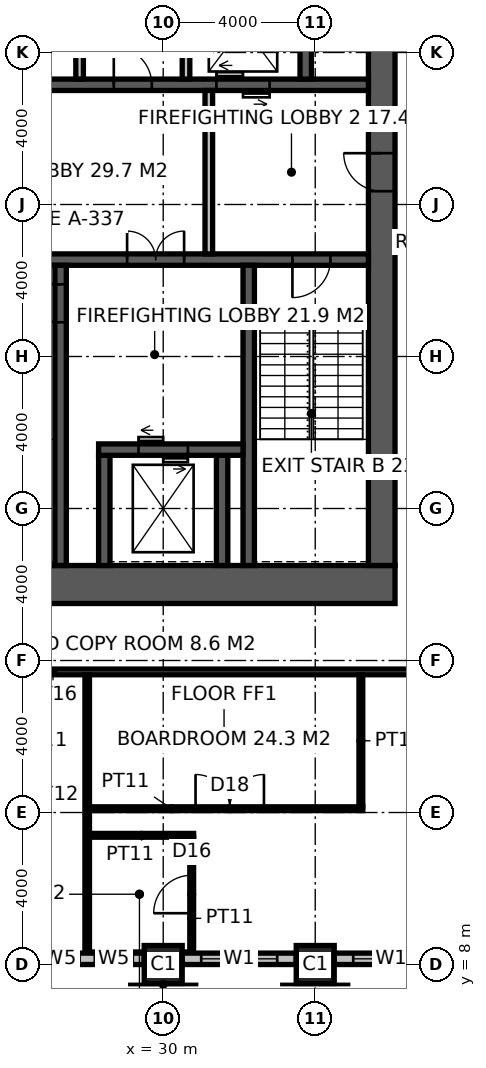
"""IFC4 building model, lengths in metres.
Left out: names, types, materials, properties, quantities, classifications, styles, units other than length and angle.
Written with IfcOpenShell. Run it as: python <this file> out.ifc"""

import sys

from ifc_helpers import new_model, si_unit, direction, frame, frame_2d, origin, origin_2d, place, context, subcontext, project, spatial, rectangle, hollow_rectangle, extrude, element, fill, save


model = new_model("IFC4")
c1 = context("Model", 3, precision=1e-05, world=origin(), true_north=direction((0.0, 1.0)))
c2 = subcontext(c1, "Body", "Model", "MODEL_VIEW")
j1 = project(units=[si_unit("LENGTHUNIT", "METRE"), si_unit("PLANEANGLEUNIT", "RADIAN")], contexts=[c1])
p1 = place(None, origin())
s1 = spatial("IfcSite", under=j1, at=p1, CompositionType="ELEMENT")
p2 = place(p1, origin())
s2 = spatial("IfcBuilding", under=s1, at=p2, CompositionType="ELEMENT")
p3 = place(p2, frame((0.0, 0.0, 230.2)))
s3 = spatial("IfcBuildingStorey", under=s2, at=p3, CompositionType="ELEMENT", Elevation=230.2)
for number, where, z_axis, x_axis in (
    (1, (30.0, 8.0, 0.0), (0.0, 0.0, 1.0), (1.0, 0.0, 0.0)),
    (2, (34.0, 8.0, 0.0), (0.0, 0.0, 1.0), (1.0, 0.0, 0.0)),
):
    element("IfcColumn", number, at=place(p3, frame(where, z_axis=z_axis, x_axis=x_axis)), inside=s3, PredefinedType="COLUMN", context=c2, shape_type="SweptSolid", body=[
        extrude(hollow_rectangle(XDim=1.0, YDim=1.0, WallThickness=0.1, at=origin_2d()), origin(), (0.0, 0.0, 1.0), 4.0),
    ])
p4 = place(p3, frame((18.5, 18.0, -0.15), z_axis=(0.0, 0.0, 1.0), x_axis=(1.0, 0.0, 0.0)))
e3 = element("IfcWall", 3, at=p4, inside=s3, PredefinedType="SHEAR", context=c2, shape_type="SweptSolid", body=[
    extrude(rectangle(XDim=17.6, YDim=1.0, at=frame_2d((8.8, 0.0))), origin(), (0.0, 0.0, 1.0), 4.0),
])
p5 = place(p4, frame((3.45, 0.0, 0.15)))
e4 = element("IfcOpeningElement", 4, at=p5, cuts=e3, PredefinedType="OPENING", context=c2, shape_type="SweptSolid", body=[
    extrude(rectangle(XDim=1.5, YDim=2.4, at=frame_2d((0.75, 1.2))), frame((0.0, 0.51, 0.0), z_axis=(0.0, -1.0, 0.0), x_axis=(1.0, 0.0, 0.0)), (0.0, 0.0, 1.0), 1.02),
])
p6 = place(p3, frame((35.75, 18.5, -0.15), z_axis=(0.0, 0.0, 1.0), x_axis=(0.0, 1.0, 0.0)))
e5 = element("IfcWall", 5, at=p6, inside=s3, PredefinedType="SHEAR", context=c2, shape_type="SweptSolid", body=[
    extrude(rectangle(XDim=17.0, YDim=0.7, at=frame_2d((8.5, 0.0))), origin(), (0.0, 0.0, 1.0), 4.0),
])
p7 = place(p6, frame((9.85, 0.0, 0.15)))
e6 = element("IfcOpeningElement", 6, at=p7, cuts=e5, PredefinedType="OPENING", context=c2, shape_type="SweptSolid", body=[
    extrude(rectangle(XDim=1.0, YDim=2.2, at=frame_2d((0.5, 1.1))), frame((0.0, 0.36, 0.0), z_axis=(0.0, -1.0, 0.0), x_axis=(1.0, 0.0, 0.0)), (0.0, 0.0, 1.0), 0.72),
])
p8 = place(p3, frame((24.15, 26.55, -0.15), z_axis=(0.0, 0.0, 1.0), x_axis=(1.0, 0.0, 0.0)))
e7 = element("IfcWall", 7, at=p8, inside=s3, PredefinedType="SHEAR", context=c2, shape_type="SweptSolid", body=[
    extrude(rectangle(XDim=11.25, YDim=0.3, at=frame_2d((5.625, 0.0))), origin(), (0.0, 0.0, 1.0), 4.0),
])
p9 = place(p8, frame((9.25, 0.0, 0.15)))
e8 = element("IfcOpeningElement", 8, at=p9, cuts=e7, PredefinedType="OPENING", context=c2, shape_type="SweptSolid", body=[
    extrude(rectangle(XDim=1.0, YDim=2.2, at=frame_2d((0.5, 1.1))), frame((0.0, 0.16, 0.0), z_axis=(0.0, -1.0, 0.0), x_axis=(1.0, 0.0, 0.0)), (0.0, 0.0, 1.0), 0.32),
])
p10 = place(p8, frame((4.9, 0.0, 0.15)))
e9 = element("IfcOpeningElement", 9, at=p10, cuts=e7, PredefinedType="OPENING", context=c2, shape_type="SweptSolid", body=[
    extrude(rectangle(XDim=1.5, YDim=2.4, at=frame_2d((0.75, 1.2))), frame((0.0, 0.16, 0.0), z_axis=(0.0, -1.0, 0.0), x_axis=(1.0, 0.0, 0.0)), (0.0, 0.0, 1.0), 0.32),
])
p11 = place(p3, frame((27.3, 18.5, -0.15), z_axis=(0.0, 0.0, 1.0), x_axis=(0.0, 1.0, 0.0)))
e10 = element("IfcWall", 10, at=p11, inside=s3, PredefinedType="SHEAR", context=c2, shape_type="SweptSolid", body=[
    extrude(rectangle(XDim=7.9, YDim=0.3, at=frame_2d((3.95, 0.0))), origin(), (0.0, 0.0, 1.0), 4.0),
])
p12 = place(p11, frame((6.4, 0.0, 0.15)))
e11 = element("IfcOpeningElement", 11, at=p12, cuts=e10, PredefinedType="OPENING", context=c2, shape_type="SweptSolid", body=[
    extrude(rectangle(XDim=1.0, YDim=2.2, at=frame_2d((0.5, 1.1))), frame((0.0, 0.16, 0.0), z_axis=(0.0, -1.0, 0.0), x_axis=(1.0, 0.0, 0.0)), (0.0, 0.0, 1.0), 0.32),
])
p13 = place(p3, frame((32.25, 18.5, -0.15), z_axis=(0.0, 0.0, 1.0), x_axis=(0.0, 1.0, 0.0)))
e12 = element("IfcWall", 12, at=p13, inside=s3, PredefinedType="SHEAR", context=c2, shape_type="SweptSolid", body=[
    extrude(rectangle(XDim=7.9, YDim=0.3, at=frame_2d((3.95, 0.0))), origin(), (0.0, 0.0, 1.0), 4.0),
])
for number, where, z_axis, x_axis in (
    (13, (28.45, 18.5, -0.15), (0.0, 0.0, 1.0), (0.0, 1.0, 0.0)),
    (14, (31.55, 18.5, -0.15), (0.0, 0.0, 1.0), (0.0, 1.0, 0.0)),
):
    element("IfcWall", number, at=place(p3, frame(where, z_axis=z_axis, x_axis=x_axis)), inside=s3, PredefinedType="SHEAR", context=c2, shape_type="SweptSolid", body=[
        extrude(rectangle(XDim=2.9, YDim=0.3, at=frame_2d((1.45, 0.0))), origin(), (0.0, 0.0, 1.0), 4.0),
    ])
p14 = place(p3, frame((28.3, 21.55, -0.15), z_axis=(0.0, 0.0, 1.0), x_axis=(1.0, 0.0, 0.0)))
e15 = element("IfcWall", 15, at=p14, inside=s3, PredefinedType="SHEAR", context=c2, shape_type="SweptSolid", body=[
    extrude(rectangle(XDim=3.8, YDim=0.3, at=frame_2d((1.9, 0.0))), origin(), (0.0, 0.0, 1.0), 4.0),
])
p15 = place(p14, frame((1.05, 0.0, 0.15)))
e16 = element("IfcOpeningElement", 16, at=p15, cuts=e15, PredefinedType="OPENING", context=c2, shape_type="SweptSolid", body=[
    extrude(rectangle(XDim=1.3, YDim=2.4, at=frame_2d((0.65, 1.2))), frame((0.0, 0.16, 0.0), z_axis=(0.0, -1.0, 0.0), x_axis=(1.0, 0.0, 0.0)), (0.0, 0.0, 1.0), 0.32),
])
p16 = place(p3, frame((24.15, 31.15, -0.15), z_axis=(0.0, 0.0, 1.0), x_axis=(1.0, 0.0, 0.0)))
e17 = element("IfcWall", 17, at=p16, inside=s3, PredefinedType="SHEAR", context=c2, shape_type="SweptSolid", body=[
    extrude(rectangle(XDim=11.25, YDim=0.3, at=frame_2d((5.625, 0.0))), origin(), (0.0, 0.0, 1.0), 4.0),
])
p17 = place(p16, frame((1.75, 0.0, 0.15)))
e18 = element("IfcOpeningElement", 18, at=p17, cuts=e17, PredefinedType="OPENING", context=c2, shape_type="SweptSolid", body=[
    extrude(rectangle(XDim=1.0, YDim=2.2, at=frame_2d((0.5, 1.1))), frame((0.0, 0.16, 0.0), z_axis=(0.0, -1.0, 0.0), x_axis=(1.0, 0.0, 0.0)), (0.0, 0.0, 1.0), 0.32),
])
p18 = place(p16, frame((4.55, 0.0, 0.15)))
e19 = element("IfcOpeningElement", 19, at=p18, cuts=e17, PredefinedType="OPENING", context=c2, shape_type="SweptSolid", body=[
    extrude(rectangle(XDim=1.0, YDim=2.2, at=frame_2d((0.5, 1.1))), frame((0.0, 0.16, 0.0), z_axis=(0.0, -1.0, 0.0), x_axis=(1.0, 0.0, 0.0)), (0.0, 0.0, 1.0), 0.32),
])
p19 = place(p16, frame((7.25, 0.0, 0.15)))
e20 = element("IfcOpeningElement", 20, at=p19, cuts=e17, PredefinedType="OPENING", context=c2, shape_type="SweptSolid", body=[
    extrude(rectangle(XDim=1.4, YDim=2.4, at=frame_2d((0.7, 1.2))), frame((0.0, 0.16, 0.0), z_axis=(0.0, -1.0, 0.0), x_axis=(1.0, 0.0, 0.0)), (0.0, 0.0, 1.0), 0.32),
])
p20 = place(p3, frame((33.75, 31.3, -0.15), z_axis=(0.0, 0.0, 1.0), x_axis=(0.0, 1.0, 0.0)))
e21 = element("IfcWall", 21, at=p20, inside=s3, PredefinedType="SHEAR", context=c2, shape_type="SweptSolid", body=[
    extrude(rectangle(XDim=4.2, YDim=0.3, at=frame_2d((2.1, 0.0))), origin(), (0.0, 0.0, 1.0), 4.0),
])
for number, where, z_axis, x_axis in (
    (22, (27.8, 31.3, -0.15), (0.0, 0.0, 1.0), (0.0, 1.0, 0.0)),
    (23, (30.6, 31.3, -0.15), (0.0, 0.0, 1.0), (0.0, 1.0, 0.0)),
):
    element("IfcWall", number, at=place(p3, frame(where, z_axis=z_axis, x_axis=x_axis)), inside=s3, PredefinedType="SOLIDWALL", context=c2, shape_type="SweptSolid", body=[
        extrude(rectangle(XDim=2.8, YDim=0.2, at=frame_2d((1.4, 0.0))), origin(), (0.0, 0.0, 1.0), 4.0),
    ])
p21 = place(p3, frame((31.2, 26.7, 0.0), z_axis=(0.0, 0.0, 1.0), x_axis=(0.0, 1.0, 0.0)))
e24 = element("IfcWall", 24, at=p21, inside=s3, PredefinedType="SOLIDWALL", context=c2, shape_type="SweptSolid", body=[
    extrude(rectangle(XDim=4.3, YDim=0.2, at=frame_2d((2.15, 0.0))), origin(), (0.0, 0.0, 1.0), 3.85),
])
p22 = place(p3, frame((15.775, 15.7, 0.0), z_axis=(0.0, 0.0, 1.0), x_axis=(1.0, 0.0, 0.0)))
e25 = element("IfcWall", 25, at=p22, inside=s3, PredefinedType="PARTITIONING", context=c2, shape_type="SweptSolid", body=[
    extrude(rectangle(XDim=22.65, YDim=0.15, at=frame_2d((11.325, 0.0))), origin(), (0.0, 0.0, 1.0), 3.85),
])
p23 = place(p3, frame((28.0, 8.3, 0.0), z_axis=(0.0, 0.0, 1.0), x_axis=(0.0, 1.0, 0.0)))
e26 = element("IfcWall", 26, at=p23, inside=s3, PredefinedType="PARTITIONING", context=c2, shape_type="SweptSolid", body=[
    extrude(rectangle(XDim=7.325, YDim=0.12, at=frame_2d((3.663, 0.0))), origin(), (0.0, 0.0, 1.0), 3.85),
])
p24 = place(p3, frame((28.06, 11.4, 0.0), z_axis=(0.0, 0.0, 1.0), x_axis=(1.0, 0.0, 0.0)))
e27 = element("IfcWall", 27, at=p24, inside=s3, PredefinedType="PARTITIONING", context=c2, shape_type="SweptSolid", body=[
    extrude(rectangle(XDim=2.74, YDim=0.1, at=frame_2d((1.37, 0.0))), origin(), (0.0, 0.0, 1.0), 3.85),
])
p25 = place(p3, frame((28.061, 12.1, 0.0), z_axis=(0.0, 0.0, 1.0), x_axis=(1.0, 0.0, 0.0)))
e28 = element("IfcWall", 28, at=p25, inside=s3, PredefinedType="PARTITIONING", context=c2, shape_type="SweptSolid", body=[
    extrude(rectangle(XDim=7.19, YDim=0.1, at=frame_2d((3.595, 0.0))), origin(), (0.0, 0.0, 1.0), 3.85),
])
p26 = place(p25, frame((2.79, 0.0, 0.0)))
e29 = element("IfcOpeningElement", 29, at=p26, cuts=e28, PredefinedType="OPENING", context=c2, shape_type="SweptSolid", body=[
    extrude(rectangle(XDim=1.8, YDim=2.4, at=frame_2d((0.9, 1.2))), frame((0.0, 0.06, 0.0), z_axis=(0.0, -1.0, 0.0), x_axis=(1.0, 0.0, 0.0)), (0.0, 0.0, 1.0), 0.12),
])
p27 = place(p3, frame((30.75, 8.3, 0.0), z_axis=(0.0, 0.0, 1.0), x_axis=(0.0, 1.0, 0.0)))
e30 = element("IfcWall", 30, at=p27, inside=s3, PredefinedType="PARTITIONING", context=c2, shape_type="SweptSolid", body=[
    extrude(rectangle(XDim=3.05, YDim=0.1, at=frame_2d((1.525, 0.0))), origin(), (0.0, 0.0, 1.0), 3.85),
])
p28 = place(p27, frame((1.05, 0.0, 0.0)))
e31 = element("IfcOpeningElement", 31, at=p28, cuts=e30, PredefinedType="OPENING", context=c2, shape_type="SweptSolid", body=[
    extrude(rectangle(XDim=1.0, YDim=2.2, at=frame_2d((0.5, 1.1))), frame((0.0, 0.06, 0.0), z_axis=(0.0, -1.0, 0.0), x_axis=(1.0, 0.0, 0.0)), (0.0, 0.0, 1.0), 0.12),
])
p29 = place(p3, frame((35.201, 12.15, 0.0), z_axis=(0.0, 0.0, 1.0), x_axis=(0.0, 1.0, 0.0)))
e32 = element("IfcWall", 32, at=p29, inside=s3, PredefinedType="PARTITIONING", context=c2, shape_type="SweptSolid", body=[
    extrude(rectangle(XDim=3.475, YDim=0.1, at=frame_2d((1.738, 0.0))), origin(), (0.0, 0.0, 1.0), 3.85),
])
p30 = place(p3, frame((26.5, 8.15, 0.0), z_axis=(0.0, 0.0, 1.0), x_axis=(1.0, 0.0, 0.0)))
e33 = element("IfcWall", 33, at=p30, inside=s3, PredefinedType="ELEMENTEDWALL", context=c2, shape_type="SweptSolid", body=[
    extrude(rectangle(XDim=3.0, YDim=0.3, at=frame_2d((1.5, 0.0))), origin(), (0.0, 0.0, 1.0), 2.85),
])
p31 = place(p30, frame((0.3, 0.0, 0.8)))
e34 = element("IfcOpeningElement", 34, at=p31, cuts=e33, PredefinedType="OPENING", context=c2, shape_type="SweptSolid", body=[
    extrude(rectangle(XDim=1.0, YDim=2.0, at=frame_2d((0.5, 1.0))), frame((0.0, 0.16, 0.0), z_axis=(0.0, -1.0, 0.0), x_axis=(1.0, 0.0, 0.0)), (0.0, 0.0, 1.0), 0.32),
])
p32 = place(p30, frame((1.7, 0.0, 0.8)))
e35 = element("IfcOpeningElement", 35, at=p32, cuts=e33, PredefinedType="OPENING", context=c2, shape_type="SweptSolid", body=[
    extrude(rectangle(XDim=1.0, YDim=2.0, at=frame_2d((0.5, 1.0))), frame((0.0, 0.16, 0.0), z_axis=(0.0, -1.0, 0.0), x_axis=(1.0, 0.0, 0.0)), (0.0, 0.0, 1.0), 0.32),
])
p33 = place(p3, frame((30.5, 8.15, 0.0), z_axis=(0.0, 0.0, 1.0), x_axis=(1.0, 0.0, 0.0)))
e36 = element("IfcWall", 36, at=p33, inside=s3, PredefinedType="ELEMENTEDWALL", context=c2, shape_type="SweptSolid", body=[
    extrude(rectangle(XDim=3.0, YDim=0.3, at=frame_2d((1.5, 0.0))), origin(), (0.0, 0.0, 1.0), 2.85),
])
p34 = place(p33, frame((0.5, 0.0, 0.8)))
e37 = element("IfcOpeningElement", 37, at=p34, cuts=e36, PredefinedType="OPENING", context=c2, shape_type="SweptSolid", body=[
    extrude(rectangle(XDim=2.0, YDim=2.0, at=frame_2d((1.0, 1.0))), frame((0.0, 0.16, 0.0), z_axis=(0.0, -1.0, 0.0), x_axis=(1.0, 0.0, 0.0)), (0.0, 0.0, 1.0), 0.32),
])
p35 = place(p3, frame((34.5, 8.15, 0.0), z_axis=(0.0, 0.0, 1.0), x_axis=(1.0, 0.0, 0.0)))
e38 = element("IfcWall", 38, at=p35, inside=s3, PredefinedType="ELEMENTEDWALL", context=c2, shape_type="SweptSolid", body=[
    extrude(rectangle(XDim=3.0, YDim=0.3, at=frame_2d((1.5, 0.0))), origin(), (0.0, 0.0, 1.0), 2.85),
])
p36 = place(p35, frame((0.5, 0.0, 0.8)))
e39 = element("IfcOpeningElement", 39, at=p36, cuts=e38, PredefinedType="OPENING", context=c2, shape_type="SweptSolid", body=[
    extrude(rectangle(XDim=2.0, YDim=2.0, at=frame_2d((1.0, 1.0))), frame((0.0, 0.16, 0.0), z_axis=(0.0, -1.0, 0.0), x_axis=(1.0, 0.0, 0.0)), (0.0, 0.0, 1.0), 0.32),
])
p37 = place(p12, origin())
e40 = element("IfcDoor", 40, at=p37, inside=s3, OperationType="SINGLE_SWING_RIGHT", PredefinedType="DOOR", context=c2, shape_type="SweptSolid", body=[
    extrude(rectangle(XDim=1.0, YDim=2.2, at=frame_2d((0.5, 1.1))), frame((0.0, 0.025, 0.0), z_axis=(0.0, -1.0, 0.0), x_axis=(1.0, 0.0, 0.0)), (0.0, 0.0, 1.0), 0.05),
])
fill(e11, e40)
p38 = place(p9, frame((1.0, 0.0, 0.0), z_axis=(0.0, 0.0, 1.0), x_axis=(-1.0, 0.0, 0.0)))
e41 = element("IfcDoor", 41, at=p38, inside=s3, OperationType="SINGLE_SWING_RIGHT", PredefinedType="DOOR", context=c2, shape_type="SweptSolid", body=[
    extrude(rectangle(XDim=1.0, YDim=2.2, at=frame_2d((0.5, 1.1))), frame((0.0, 0.025, 0.0), z_axis=(0.0, -1.0, 0.0), x_axis=(1.0, 0.0, 0.0)), (0.0, 0.0, 1.0), 0.05),
])
fill(e8, e41)
p39 = place(p7, origin())
e42 = element("IfcDoor", 42, at=p39, inside=s3, OperationType="SINGLE_SWING_RIGHT", PredefinedType="DOOR", context=c2, shape_type="SweptSolid", body=[
    extrude(rectangle(XDim=1.0, YDim=2.2, at=frame_2d((0.5, 1.1))), frame((0.0, 0.025, 0.0), z_axis=(0.0, -1.0, 0.0), x_axis=(1.0, 0.0, 0.0)), (0.0, 0.0, 1.0), 0.05),
])
fill(e6, e42)
p40 = place(p10, origin())
e43 = element("IfcDoor", 43, at=p40, inside=s3, OperationType="DOUBLE_DOOR_DOUBLE_SWING", PredefinedType="DOOR", context=c2, shape_type="SweptSolid", body=[
    extrude(rectangle(XDim=1.5, YDim=2.4, at=frame_2d((0.75, 1.2))), frame((0.0, 0.025, 0.0), z_axis=(0.0, -1.0, 0.0), x_axis=(1.0, 0.0, 0.0)), (0.0, 0.0, 1.0), 0.05),
])
fill(e9, e43)
p41 = place(p18, origin())
e44 = element("IfcDoor", 44, at=p41, inside=s3, OperationType="SINGLE_SWING_LEFT", PredefinedType="DOOR", context=c2, shape_type="SweptSolid", body=[
    extrude(rectangle(XDim=1.0, YDim=2.2, at=frame_2d((0.5, 1.1))), frame((0.0, 0.025, 0.0), z_axis=(0.0, -1.0, 0.0), x_axis=(1.0, 0.0, 0.0)), (0.0, 0.0, 1.0), 0.05),
])
fill(e19, e44)
p42 = place(p26, origin())
e45 = element("IfcDoor", 45, at=p42, inside=s3, OperationType="DOUBLE_DOOR_DOUBLE_SWING", PredefinedType="DOOR", context=c2, shape_type="SweptSolid", body=[
    extrude(rectangle(XDim=1.8, YDim=2.4, at=frame_2d((0.9, 1.2))), frame((0.0, 0.025, 0.0), z_axis=(0.0, -1.0, 0.0), x_axis=(1.0, 0.0, 0.0)), (0.0, 0.0, 1.0), 0.05),
])
fill(e29, e45)
p43 = place(p28, origin())
e46 = element("IfcDoor", 46, at=p43, inside=s3, OperationType="SINGLE_SWING_LEFT", PredefinedType="DOOR", context=c2, shape_type="SweptSolid", body=[
    extrude(rectangle(XDim=1.0, YDim=2.2, at=frame_2d((0.5, 1.1))), frame((0.0, 0.025, 0.0), z_axis=(0.0, -1.0, 0.0), x_axis=(1.0, 0.0, 0.0)), (0.0, 0.0, 1.0), 0.05),
])
fill(e31, e46)
p44 = place(p15, origin())
e47 = element("IfcDoor", 47, at=p44, inside=s3, OperationType="DOUBLE_DOOR_SLIDING", PredefinedType="DOOR", context=c2, shape_type="SweptSolid", body=[
    extrude(rectangle(XDim=1.3, YDim=2.4, at=frame_2d((0.65, 1.2))), frame((0.0, 0.025, 0.0), z_axis=(0.0, -1.0, 0.0), x_axis=(1.0, 0.0, 0.0)), (0.0, 0.0, 1.0), 0.05),
])
fill(e16, e47)
p45 = place(p19, origin())
e48 = element("IfcDoor", 48, at=p45, inside=s3, OperationType="DOUBLE_DOOR_SLIDING", PredefinedType="DOOR", context=c2, shape_type="SweptSolid", body=[
    extrude(rectangle(XDim=1.4, YDim=2.4, at=frame_2d((0.7, 1.2))), frame((0.0, 0.025, 0.0), z_axis=(0.0, -1.0, 0.0), x_axis=(1.0, 0.0, 0.0)), (0.0, 0.0, 1.0), 0.05),
])
fill(e20, e48)
p46 = place(p31, origin())
e49 = element("IfcWindow", 49, at=p46, inside=s3, PartitioningType="SINGLE_PANEL", PredefinedType="WINDOW", context=c2, shape_type="SweptSolid", body=[
    extrude(rectangle(XDim=1.0, YDim=2.0, at=frame_2d((0.5, 1.0))), frame((0.0, 0.03, 0.0), z_axis=(0.0, -1.0, 0.0), x_axis=(1.0, 0.0, 0.0)), (0.0, 0.0, 1.0), 0.06),
])
fill(e34, e49)
p47 = place(p32, origin())
e50 = element("IfcWindow", 50, at=p47, inside=s3, PartitioningType="SINGLE_PANEL", PredefinedType="WINDOW", context=c2, shape_type="SweptSolid", body=[
    extrude(rectangle(XDim=1.0, YDim=2.0, at=frame_2d((0.5, 1.0))), frame((0.0, 0.03, 0.0), z_axis=(0.0, -1.0, 0.0), x_axis=(1.0, 0.0, 0.0)), (0.0, 0.0, 1.0), 0.06),
])
fill(e35, e50)
p48 = place(p34, origin())
e51 = element("IfcWindow", 51, at=p48, inside=s3, PartitioningType="SINGLE_PANEL", PredefinedType="WINDOW", context=c2, shape_type="SweptSolid", body=[
    extrude(rectangle(XDim=2.0, YDim=2.0, at=frame_2d((1.0, 1.0))), frame((0.0, 0.03, 0.0), z_axis=(0.0, -1.0, 0.0), x_axis=(1.0, 0.0, 0.0)), (0.0, 0.0, 1.0), 0.06),
])
fill(e37, e51)
p49 = place(p36, origin())
e52 = element("IfcWindow", 52, at=p49, inside=s3, PartitioningType="SINGLE_PANEL", PredefinedType="WINDOW", context=c2, shape_type="SweptSolid", body=[
    extrude(rectangle(XDim=2.0, YDim=2.0, at=frame_2d((1.0, 1.0))), frame((0.0, 0.03, 0.0), z_axis=(0.0, -1.0, 0.0), x_axis=(1.0, 0.0, 0.0)), (0.0, 0.0, 1.0), 0.06),
])
fill(e39, e52)
save(model, sys.argv[1])
